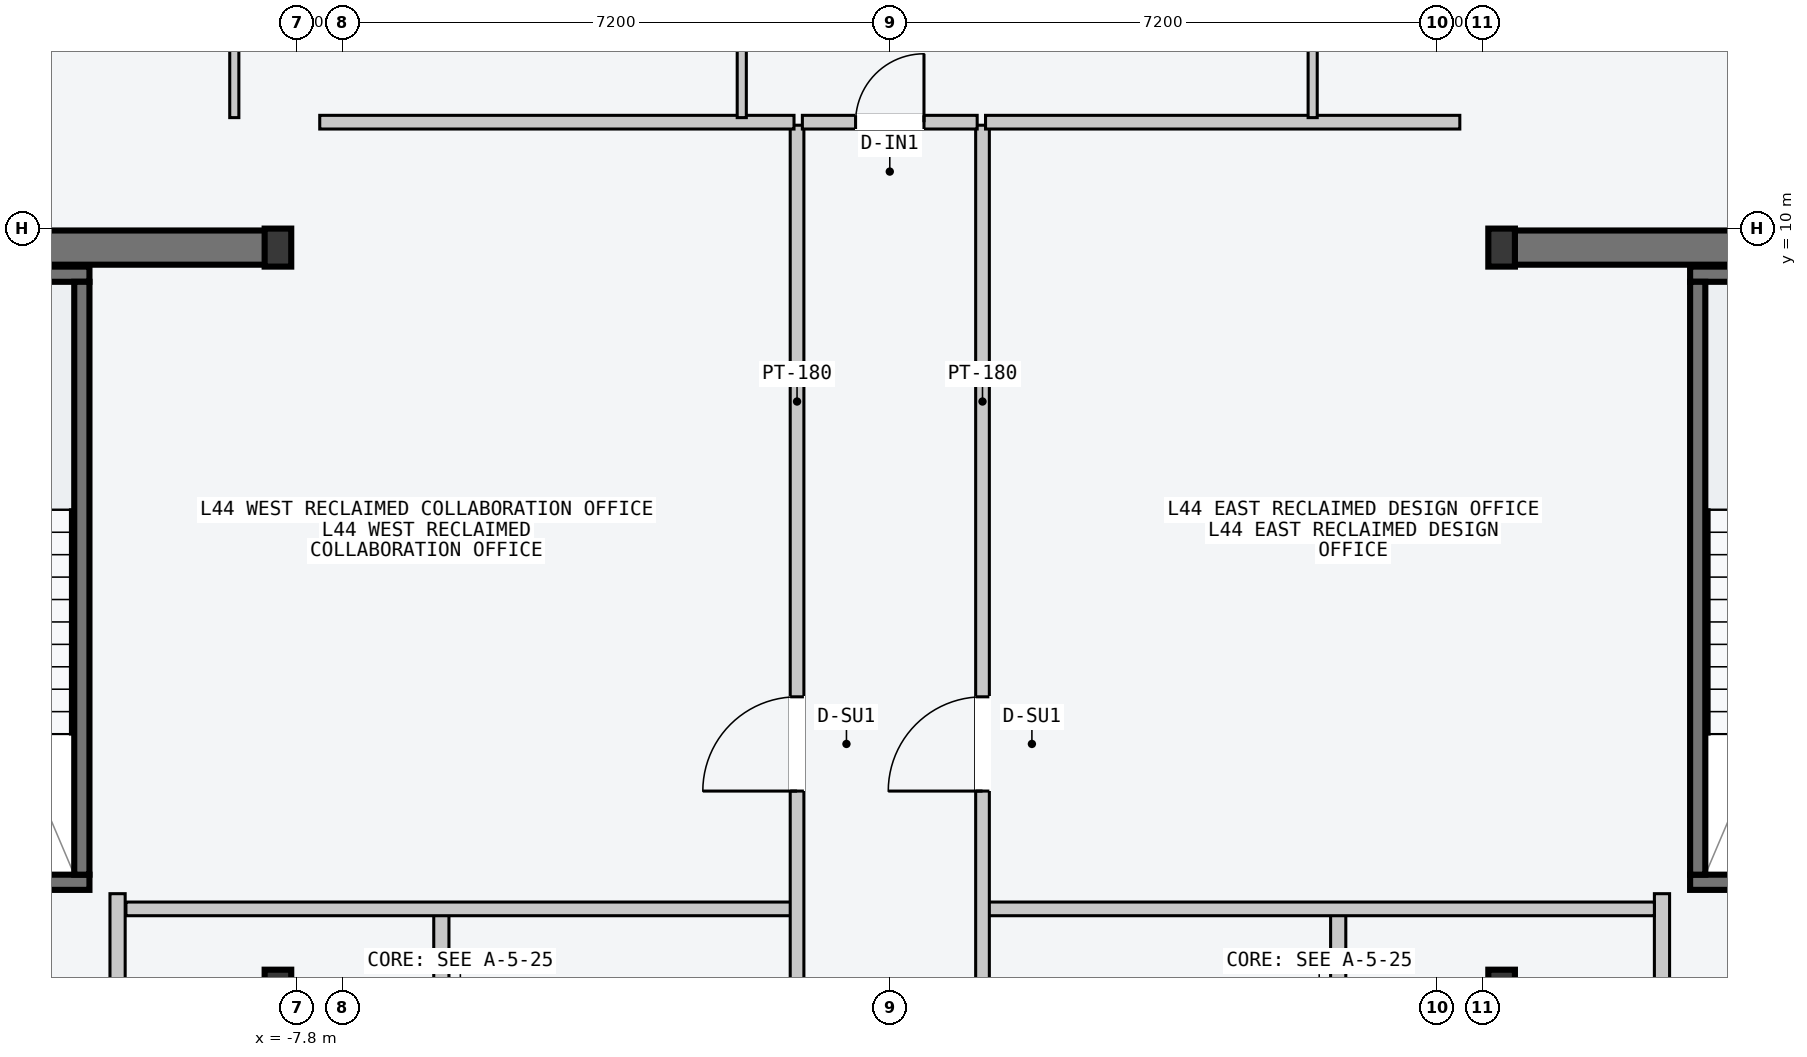
"""IFC4 building model, lengths in metres.
Left out: names, types, materials, properties, quantities, classifications, styles, units other than length and angle.
Written with IfcOpenShell. Run it as: python <this file> out.ifc"""

import sys

from ifc_helpers import new_model, si_unit, direction, frame, frame_2d, origin, origin_2d, place, context, subcontext, project, spatial, rectangle, i_section, extrude, element, fill, save


model = new_model("IFC4")
c1 = context("Model", 3, precision=1e-05, world=origin(), true_north=direction((0.0, 1.0)))
c2 = subcontext(c1, "Body", "Model", "MODEL_VIEW")
j1 = project(units=[si_unit("LENGTHUNIT", "METRE"), si_unit("PLANEANGLEUNIT", "RADIAN")], contexts=[c1])
p1 = place(None, origin())
s1 = spatial("IfcSite", under=j1, at=p1, CompositionType="ELEMENT")
p2 = place(p1, origin())
s2 = spatial("IfcBuilding", under=s1, at=p2, CompositionType="ELEMENT")
p3 = place(p2, frame((0.0, 0.0, 169.5)))
s3 = spatial("IfcBuildingStorey", under=s2, at=p3, CompositionType="ELEMENT", Elevation=169.5)
for number, where, z_axis, x_axis in (
    (1, (-14.53, 9.75, -0.2), (0.0, 0.0, 1.0), (1.0, 0.0, 0.0)),
    (2, (8.07, 9.75, -0.2), (0.0, 0.0, 1.0), (1.0, 0.0, 0.0)),
):
    element("IfcWall", number, at=place(p3, frame(where, z_axis=z_axis, x_axis=x_axis)), inside=s3, PredefinedType="SHEAR", context=c2, shape_type="SweptSolid", body=[
        extrude(rectangle(XDim=6.46, YDim=0.45, at=frame_2d((3.23, 0.0))), origin(), (0.0, 0.0, 1.0), 3.6),
    ])
p4 = place(p3, frame((-14.25, 1.4, -0.2), z_axis=(0.0, 0.0, 1.0), x_axis=(1.0, 0.0, 0.0)))
e3 = element("IfcWall", 3, at=p4, inside=s3, PredefinedType="SOLIDWALL", context=c2, shape_type="SweptSolid", body=[
    extrude(rectangle(XDim=3.72, YDim=0.2, at=frame_2d((1.86, 0.0))), origin(), (0.0, 0.0, 1.0), 3.6),
])
p5 = place(p4, frame((1.5, 0.0, 0.2)))
e4 = element("IfcOpeningElement", 4, at=p5, cuts=e3, PredefinedType="OPENING", context=c2, shape_type="SweptSolid", body=[
    extrude(rectangle(XDim=1.12, YDim=2.18, at=frame_2d((0.56, 1.09))), frame((0.0, 0.11, 0.0), z_axis=(0.0, -1.0, 0.0), x_axis=(1.0, 0.0, 0.0)), (0.0, 0.0, 1.0), 0.22),
])
p6 = place(p3, frame((-14.25, 9.4, -0.2), z_axis=(0.0, 0.0, 1.0), x_axis=(1.0, 0.0, 0.0)))
e5 = element("IfcWall", 5, at=p6, inside=s3, PredefinedType="SOLIDWALL", context=c2, shape_type="SweptSolid", body=[
    extrude(rectangle(XDim=3.72, YDim=0.2, at=frame_2d((1.86, 0.0))), origin(), (0.0, 0.0, 1.0), 3.6),
])
p7 = place(p3, frame((-10.63, 1.5, -0.2), z_axis=(0.0, 0.0, 1.0), x_axis=(0.0, 1.0, 0.0)))
e6 = element("IfcWall", 6, at=p7, inside=s3, PredefinedType="SOLIDWALL", context=c2, shape_type="SweptSolid", body=[
    extrude(rectangle(XDim=7.8, YDim=0.2, at=frame_2d((3.9, 0.0))), origin(), (0.0, 0.0, 1.0), 3.6),
])
p8 = place(p3, frame((10.53, 1.4, -0.2), z_axis=(0.0, 0.0, 1.0), x_axis=(1.0, 0.0, 0.0)))
e7 = element("IfcWall", 7, at=p8, inside=s3, PredefinedType="SOLIDWALL", context=c2, shape_type="SweptSolid", body=[
    extrude(rectangle(XDim=3.72, YDim=0.2, at=frame_2d((1.86, 0.0))), origin(), (0.0, 0.0, 1.0), 3.6),
])
p9 = place(p8, frame((1.5, 0.0, 0.2)))
e8 = element("IfcOpeningElement", 8, at=p9, cuts=e7, PredefinedType="OPENING", context=c2, shape_type="SweptSolid", body=[
    extrude(rectangle(XDim=1.12, YDim=2.18, at=frame_2d((0.56, 1.09))), frame((0.0, 0.11, 0.0), z_axis=(0.0, -1.0, 0.0), x_axis=(1.0, 0.0, 0.0)), (0.0, 0.0, 1.0), 0.22),
])
p10 = place(p3, frame((10.53, 9.4, -0.2), z_axis=(0.0, 0.0, 1.0), x_axis=(1.0, 0.0, 0.0)))
e9 = element("IfcWall", 9, at=p10, inside=s3, PredefinedType="SOLIDWALL", context=c2, shape_type="SweptSolid", body=[
    extrude(rectangle(XDim=3.72, YDim=0.2, at=frame_2d((1.86, 0.0))), origin(), (0.0, 0.0, 1.0), 3.6),
])
p11 = place(p3, frame((10.63, 1.5, -0.2), z_axis=(0.0, 0.0, 1.0), x_axis=(0.0, 1.0, 0.0)))
e10 = element("IfcWall", 10, at=p11, inside=s3, PredefinedType="SOLIDWALL", context=c2, shape_type="SweptSolid", body=[
    extrude(rectangle(XDim=7.8, YDim=0.2, at=frame_2d((3.9, 0.0))), origin(), (0.0, 0.0, 1.0), 3.6),
])
for number, where, z_axis, x_axis in (
    (11, (-8.05, 0.0, 0.0), (0.0, 0.0, 1.0), (1.0, 0.0, 0.0)),
    (12, (-8.05, 9.75, 0.0), (0.0, 0.0, 1.0), (1.0, 0.0, 0.0)),
    (13, (8.05, 0.0, 0.0), (0.0, 0.0, 1.0), (1.0, 0.0, 0.0)),
    (14, (8.05, 9.75, 0.0), (0.0, 0.0, 1.0), (1.0, 0.0, 0.0)),
):
    element("IfcColumn", number, at=place(p3, frame(where, z_axis=z_axis, x_axis=x_axis)), inside=s3, PredefinedType="COLUMN", context=c2, shape_type="SweptSolid", body=[
        extrude(i_section(OverallWidth=0.35, OverallDepth=0.5, WebThickness=0.02, FlangeThickness=0.032, at=origin_2d()), origin(), (0.0, 0.0, 1.0), 3.6),
    ])
p12 = place(p3, frame((-5.9, -9.45, 0.0), z_axis=(0.0, 0.0, 1.0), x_axis=(0.0, 1.0, 0.0)))
e15 = element("IfcWall", 15, at=p12, inside=s3, PredefinedType="PARTITIONING", context=c2, shape_type="SweptSolid", body=[
    extrude(rectangle(XDim=10.5, YDim=0.2, at=frame_2d((5.25, 0.0))), origin(), (0.0, 0.0, 1.0), 3.4),
])
p13 = place(p12, frame((3.9, 0.0, 0.0)))
e16 = element("IfcOpeningElement", 16, at=p13, cuts=e15, PredefinedType="OPENING", context=c2, shape_type="SweptSolid", body=[
    extrude(rectangle(XDim=1.5, YDim=2.2, at=frame_2d((0.75, 1.1))), frame((0.0, 0.11, 0.0), z_axis=(0.0, -1.0, 0.0), x_axis=(1.0, 0.0, 0.0)), (0.0, 0.0, 1.0), 0.22),
])
p14 = place(p3, frame((-10.16, -2.55, 0.0), z_axis=(0.0, 0.0, 1.0), x_axis=(0.0, 1.0, 0.0)))
e17 = element("IfcWall", 17, at=p14, inside=s3, PredefinedType="PARTITIONING", context=c2, shape_type="SweptSolid", body=[
    extrude(rectangle(XDim=3.8, YDim=0.2, at=frame_2d((1.9, 0.0))), origin(), (0.0, 0.0, 1.0), 3.4),
])
p15 = place(p14, frame((1.3, 0.0, 0.0)))
e18 = element("IfcOpeningElement", 18, at=p15, cuts=e17, PredefinedType="OPENING", context=c2, shape_type="SweptSolid", body=[
    extrude(rectangle(XDim=1.1, YDim=2.15, at=frame_2d((0.55, 1.075))), frame((0.0, 0.11, 0.0), z_axis=(0.0, -1.0, 0.0), x_axis=(1.0, 0.0, 0.0)), (0.0, 0.0, 1.0), 0.22),
])
p16 = place(p3, frame((5.9, -9.45, 0.0), z_axis=(0.0, 0.0, 1.0), x_axis=(0.0, 1.0, 0.0)))
e19 = element("IfcWall", 19, at=p16, inside=s3, PredefinedType="PARTITIONING", context=c2, shape_type="SweptSolid", body=[
    extrude(rectangle(XDim=10.5, YDim=0.2, at=frame_2d((5.25, 0.0))), origin(), (0.0, 0.0, 1.0), 3.4),
])
p17 = place(p16, frame((3.9, 0.0, 0.0)))
e20 = element("IfcOpeningElement", 20, at=p17, cuts=e19, PredefinedType="OPENING", context=c2, shape_type="SweptSolid", body=[
    extrude(rectangle(XDim=1.5, YDim=2.2, at=frame_2d((0.75, 1.1))), frame((0.0, 0.11, 0.0), z_axis=(0.0, -1.0, 0.0), x_axis=(1.0, 0.0, 0.0)), (0.0, 0.0, 1.0), 0.22),
])
p18 = place(p3, frame((10.16, -2.55, 0.0), z_axis=(0.0, 0.0, 1.0), x_axis=(0.0, 1.0, 0.0)))
e21 = element("IfcWall", 21, at=p18, inside=s3, PredefinedType="PARTITIONING", context=c2, shape_type="SweptSolid", body=[
    extrude(rectangle(XDim=3.8, YDim=0.2, at=frame_2d((1.9, 0.0))), origin(), (0.0, 0.0, 1.0), 3.4),
])
p19 = place(p18, frame((1.3, 0.0, 0.0)))
e22 = element("IfcOpeningElement", 22, at=p19, cuts=e21, PredefinedType="OPENING", context=c2, shape_type="SweptSolid", body=[
    extrude(rectangle(XDim=1.1, YDim=2.15, at=frame_2d((0.55, 1.075))), frame((0.0, 0.11, 0.0), z_axis=(0.0, -1.0, 0.0), x_axis=(1.0, 0.0, 0.0)), (0.0, 0.0, 1.0), 0.22),
])
p20 = place(p3, frame((-10.05, 1.05, 0.0), z_axis=(0.0, 0.0, 1.0), x_axis=(1.0, 0.0, 0.0)))
e23 = element("IfcWall", 23, at=p20, inside=s3, PredefinedType="PARTITIONING", context=c2, shape_type="SweptSolid", body=[
    extrude(rectangle(XDim=8.79, YDim=0.18, at=frame_2d((4.395, 0.0))), origin(), (0.0, 0.0, 1.0), 3.4),
])
p21 = place(p3, frame((-1.22, -3.5, 0.0), z_axis=(0.0, 0.0, 1.0), x_axis=(0.0, 1.0, 0.0)))
e24 = element("IfcWall", 24, at=p21, inside=s3, PredefinedType="PARTITIONING", context=c2, shape_type="SweptSolid", body=[
    extrude(rectangle(XDim=14.86, YDim=0.18, at=frame_2d((7.43, 0.0))), origin(), (0.0, 0.0, 1.0), 3.4),
])
p22 = place(p21, frame((6.1, 0.0, 0.0)))
e25 = element("IfcOpeningElement", 25, at=p22, cuts=e24, PredefinedType="OPENING", context=c2, shape_type="SweptSolid", body=[
    extrude(rectangle(XDim=1.24, YDim=2.24, at=frame_2d((0.62, 1.12))), frame((0.0, 0.1, 0.0), z_axis=(0.0, -1.0, 0.0), x_axis=(1.0, 0.0, 0.0)), (0.0, 0.0, 1.0), 0.2),
])
p23 = place(p21, frame((1.6, 0.0, 0.0)))
e26 = element("IfcOpeningElement", 26, at=p23, cuts=e24, PredefinedType="OPENING", context=c2, shape_type="SweptSolid", body=[
    extrude(rectangle(XDim=0.96, YDim=2.18, at=frame_2d((0.48, 1.09))), frame((0.0, 0.1, 0.0), z_axis=(0.0, -1.0, 0.0), x_axis=(1.0, 0.0, 0.0)), (0.0, 0.0, 1.0), 0.2),
])
p24 = place(p3, frame((-7.5, 11.4, 0.0), z_axis=(0.0, 0.0, 1.0), x_axis=(1.0, 0.0, 0.0)))
e27 = element("IfcWall", 27, at=p24, inside=s3, PredefinedType="PARTITIONING", context=c2, shape_type="SweptSolid", body=[
    extrude(rectangle(XDim=6.24, YDim=0.18, at=frame_2d((3.12, 0.0))), origin(), (0.0, 0.0, 1.0), 3.4),
])
p25 = place(p3, frame((1.26, 1.05, 0.0), z_axis=(0.0, 0.0, 1.0), x_axis=(1.0, 0.0, 0.0)))
e28 = element("IfcWall", 28, at=p25, inside=s3, PredefinedType="PARTITIONING", context=c2, shape_type="SweptSolid", body=[
    extrude(rectangle(XDim=8.8, YDim=0.18, at=frame_2d((4.4, 0.0))), origin(), (0.0, 0.0, 1.0), 3.4),
])
p26 = place(p3, frame((1.22, -3.5, 0.0), z_axis=(0.0, 0.0, 1.0), x_axis=(0.0, 1.0, 0.0)))
e29 = element("IfcWall", 29, at=p26, inside=s3, PredefinedType="PARTITIONING", context=c2, shape_type="SweptSolid", body=[
    extrude(rectangle(XDim=14.86, YDim=0.18, at=frame_2d((7.43, 0.0))), origin(), (0.0, 0.0, 1.0), 3.4),
])
p27 = place(p26, frame((6.1, 0.0, 0.0)))
e30 = element("IfcOpeningElement", 30, at=p27, cuts=e29, PredefinedType="OPENING", context=c2, shape_type="SweptSolid", body=[
    extrude(rectangle(XDim=1.24, YDim=2.24, at=frame_2d((0.62, 1.12))), frame((0.0, 0.1, 0.0), z_axis=(0.0, -1.0, 0.0), x_axis=(1.0, 0.0, 0.0)), (0.0, 0.0, 1.0), 0.2),
])
p28 = place(p26, frame((1.6, 0.0, 0.0)))
e31 = element("IfcOpeningElement", 31, at=p28, cuts=e29, PredefinedType="OPENING", context=c2, shape_type="SweptSolid", body=[
    extrude(rectangle(XDim=0.96, YDim=2.18, at=frame_2d((0.48, 1.09))), frame((0.0, 0.1, 0.0), z_axis=(0.0, -1.0, 0.0), x_axis=(1.0, 0.0, 0.0)), (0.0, 0.0, 1.0), 0.2),
])
p29 = place(p3, frame((1.26, 11.4, 0.0), z_axis=(0.0, 0.0, 1.0), x_axis=(1.0, 0.0, 0.0)))
e32 = element("IfcWall", 32, at=p29, inside=s3, PredefinedType="PARTITIONING", context=c2, shape_type="SweptSolid", body=[
    extrude(rectangle(XDim=6.24, YDim=0.18, at=frame_2d((3.12, 0.0))), origin(), (0.0, 0.0, 1.0), 3.4),
])
p30 = place(p3, frame((-8.624, 11.46, 0.0), z_axis=(0.0, 0.0, 1.0), x_axis=(0.0, 1.0, 0.0)))
e33 = element("IfcWall", 33, at=p30, inside=s3, PredefinedType="PARTITIONING", context=c2, shape_type="SweptSolid", body=[
    extrude(rectangle(XDim=6.09, YDim=0.12, at=frame_2d((3.045, 0.0))), origin(), (0.0, 0.0, 1.0), 3.4),
])
p31 = place(p30, frame((1.15, 0.0, 0.0)))
e34 = element("IfcOpeningElement", 34, at=p31, cuts=e33, PredefinedType="OPENING", context=c2, shape_type="SweptSolid", body=[
    extrude(rectangle(XDim=0.96, YDim=2.18, at=frame_2d((0.48, 1.09))), frame((0.0, 0.07, 0.0), z_axis=(0.0, -1.0, 0.0), x_axis=(1.0, 0.0, 0.0)), (0.0, 0.0, 1.0), 0.14),
])
p32 = place(p3, frame((-1.948, 11.46, 0.0), z_axis=(0.0, 0.0, 1.0), x_axis=(0.0, 1.0, 0.0)))
e35 = element("IfcWall", 35, at=p32, inside=s3, PredefinedType="PARTITIONING", context=c2, shape_type="SweptSolid", body=[
    extrude(rectangle(XDim=7.1, YDim=0.12, at=frame_2d((3.55, 0.0))), origin(), (0.0, 0.0, 1.0), 3.4),
])
p33 = place(p32, frame((1.15, 0.0, 0.0)))
e36 = element("IfcOpeningElement", 36, at=p33, cuts=e35, PredefinedType="OPENING", context=c2, shape_type="SweptSolid", body=[
    extrude(rectangle(XDim=0.96, YDim=2.18, at=frame_2d((0.48, 1.09))), frame((0.0, 0.07, 0.0), z_axis=(0.0, -1.0, 0.0), x_axis=(1.0, 0.0, 0.0)), (0.0, 0.0, 1.0), 0.14),
])
p34 = place(p3, frame((5.564, 11.46, 0.0), z_axis=(0.0, 0.0, 1.0), x_axis=(0.0, 1.0, 0.0)))
e37 = element("IfcWall", 37, at=p34, inside=s3, PredefinedType="PARTITIONING", context=c2, shape_type="SweptSolid", body=[
    extrude(rectangle(XDim=7.1, YDim=0.12, at=frame_2d((3.55, 0.0))), origin(), (0.0, 0.0, 1.0), 3.4),
])
p35 = place(p34, frame((1.15, 0.0, 0.0)))
e38 = element("IfcOpeningElement", 38, at=p35, cuts=e37, PredefinedType="OPENING", context=c2, shape_type="SweptSolid", body=[
    extrude(rectangle(XDim=0.96, YDim=2.18, at=frame_2d((0.48, 1.09))), frame((0.0, 0.07, 0.0), z_axis=(0.0, -1.0, 0.0), x_axis=(1.0, 0.0, 0.0)), (0.0, 0.0, 1.0), 0.14),
])
p36 = place(p3, frame((-1.15, 11.4, 0.0), z_axis=(0.0, 0.0, 1.0), x_axis=(1.0, 0.0, 0.0)))
e39 = element("IfcWall", 39, at=p36, inside=s3, PredefinedType="PARTITIONING", context=c2, shape_type="SweptSolid", body=[
    extrude(rectangle(XDim=2.3, YDim=0.18, at=frame_2d((1.15, 0.0))), origin(), (0.0, 0.0, 1.0), 3.4),
])
p37 = place(p36, frame((0.7, 0.0, 0.0)))
e40 = element("IfcOpeningElement", 40, at=p37, cuts=e39, PredefinedType="OPENING", context=c2, shape_type="SweptSolid", body=[
    extrude(rectangle(XDim=0.9, YDim=2.15, at=frame_2d((0.45, 1.075))), frame((0.0, 0.1, 0.0), z_axis=(0.0, -1.0, 0.0), x_axis=(1.0, 0.0, 0.0)), (0.0, 0.0, 1.0), 0.2),
])
p38 = place(p22, origin())
e41 = element("IfcDoor", 41, at=p38, inside=s3, OperationType="SINGLE_SWING_LEFT", PredefinedType="DOOR", context=c2, shape_type="SweptSolid", body=[
    extrude(rectangle(XDim=1.24, YDim=2.24, at=frame_2d((0.62, 1.12))), frame((0.0, 0.025, 0.0), z_axis=(0.0, -1.0, 0.0), x_axis=(1.0, 0.0, 0.0)), (0.0, 0.0, 1.0), 0.05),
])
fill(e25, e41)
p39 = place(p27, origin())
e42 = element("IfcDoor", 42, at=p39, inside=s3, OperationType="SINGLE_SWING_LEFT", PredefinedType="DOOR", context=c2, shape_type="SweptSolid", body=[
    extrude(rectangle(XDim=1.24, YDim=2.24, at=frame_2d((0.62, 1.12))), frame((0.0, 0.025, 0.0), z_axis=(0.0, -1.0, 0.0), x_axis=(1.0, 0.0, 0.0)), (0.0, 0.0, 1.0), 0.05),
])
fill(e30, e42)
p40 = place(p37, origin())
e43 = element("IfcDoor", 43, at=p40, inside=s3, OperationType="SINGLE_SWING_RIGHT", PredefinedType="DOOR", context=c2, shape_type="SweptSolid", body=[
    extrude(rectangle(XDim=0.9, YDim=2.15, at=frame_2d((0.45, 1.075))), frame((0.0, 0.025, 0.0), z_axis=(0.0, -1.0, 0.0), x_axis=(1.0, 0.0, 0.0)), (0.0, 0.0, 1.0), 0.05),
])
fill(e40, e43)
save(model, sys.argv[1])
